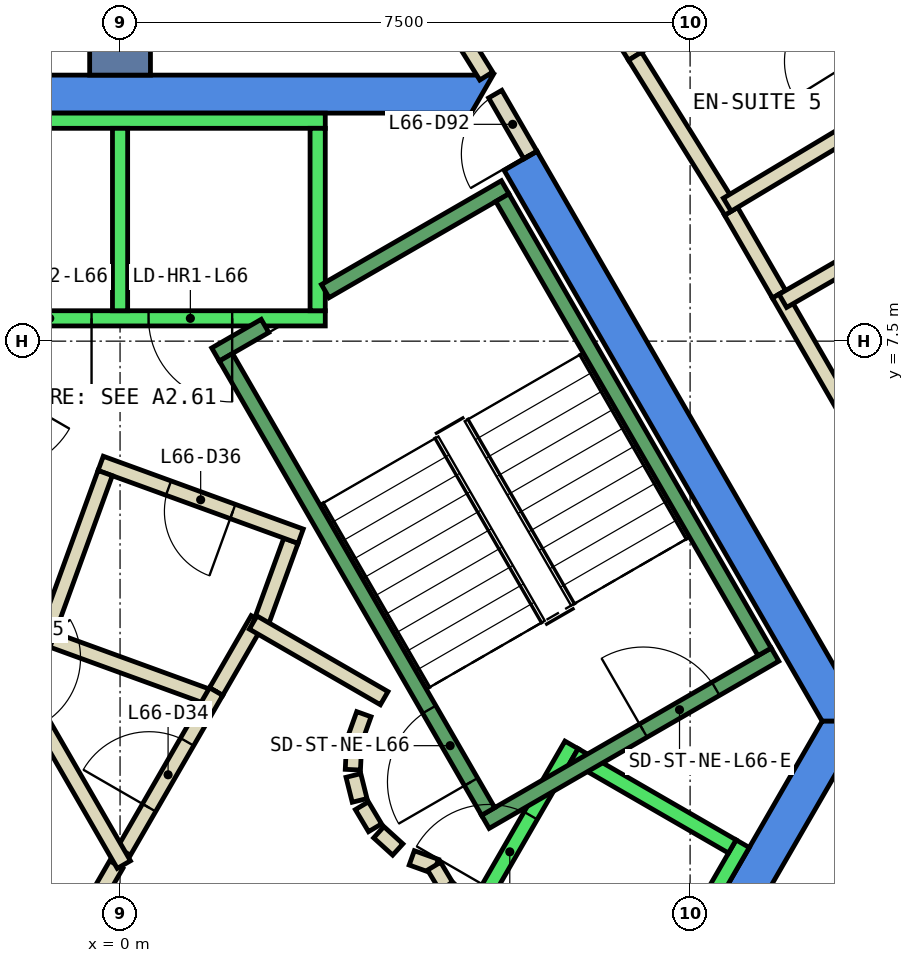
"""IFC4 building model, lengths in metres.
Left out: names, types, materials, properties, quantities, classifications, styles, units other than length and angle.
Written with IfcOpenShell. Run it as: python <this file> out.ifc"""

import sys

from ifc_helpers import new_model, si_unit, direction, frame, frame_2d, origin, place, context, subcontext, project, spatial, polyline, rectangle, outline, extrude, element, fill, save


model = new_model("IFC4")
c1 = context("Model", 3, precision=1e-05, world=origin(), true_north=direction((0.0, 1.0)))
c2 = subcontext(c1, "Body", "Model", "MODEL_VIEW")
j1 = project(units=[si_unit("LENGTHUNIT", "METRE"), si_unit("PLANEANGLEUNIT", "RADIAN")], contexts=[c1])
p1 = place(None, origin())
s1 = spatial("IfcSite", under=j1, at=p1, CompositionType="ELEMENT")
p2 = place(p1, origin())
s2 = spatial("IfcBuilding", under=s1, at=p2, CompositionType="ELEMENT")
p3 = place(p2, frame((0.0, 0.0, 286.4)))
s3 = spatial("IfcBuildingStorey", under=s2, at=p3, CompositionType="ELEMENT", Elevation=286.4)
p4 = place(p3, frame((0.0, 0.0, -0.6)))
e1 = element("IfcWall", 1, at=p4, inside=s3, PredefinedType="SHEAR", context=c2, shape_type="SweptSolid", body=[
    extrude(outline(polyline([(5.486, 9.998), (5.053, 9.748), (9.238, 2.5), (9.815, 2.5), (5.486, 9.998)])), origin(), (0.0, 0.0, 1.0), 3.86),
])
p5 = place(p3, frame((0.0, 0.0, -0.6)))
e2 = element("IfcWall", 2, at=p5, inside=s3, PredefinedType="SHEAR", context=c2, shape_type="SweptSolid", body=[
    extrude(outline(polyline([(4.907, 11.0), (-4.907, 11.0), (-4.619, 10.5), (4.619, 10.5), (4.907, 11.0)])), origin(), (0.0, 0.0, 1.0), 3.86),
])
p6 = place(p3, frame((0.0, 0.0, -0.6)))
e3 = element("IfcWall", 3, at=p6, inside=s3, PredefinedType="SHEAR", context=c2, shape_type="SweptSolid", body=[
    extrude(outline(polyline([(4.907, -6.0), (9.815, 2.5), (9.238, 2.5), (4.619, -5.5), (4.907, -6.0)])), origin(), (0.0, 0.0, 1.0), 3.86),
])
p7 = place(p3, frame((0.0, 11.0, -0.6), z_axis=(0.0, 0.0, 1.0), x_axis=(0.0, 1.0, 0.0)))
e4 = element("IfcWall", 4, at=p7, inside=s3, PredefinedType="SHEAR", context=c2, shape_type="SweptSolid", body=[
    extrude(rectangle(XDim=9.0, YDim=0.8, at=frame_2d((4.5, 0.0))), origin(), (0.0, 0.0, 1.0), 3.86),
])
p8 = place(p3, frame((1.264, 2.89, 0.0), z_axis=(0.0, 0.0, 1.0), x_axis=(0.500043792738, 0.866000118559, 0.0)))
e5 = element("IfcWall", 5, at=p8, inside=s3, PredefinedType="PARTITIONING", context=c2, shape_type="SweptSolid", body=[
    extrude(rectangle(XDim=1.096, YDim=0.2, at=frame_2d((0.548, 0.0))), origin(), (0.0, 0.0, 1.0), 3.26),
])
p9 = place(p3, frame((1.838, 3.748, 0.0), z_axis=(0.0, 0.0, 1.0), x_axis=(0.342266462435, 0.939602931398, 0.0)))
e6 = element("IfcWall", 6, at=p9, inside=s3, PredefinedType="PARTITIONING", context=c2, shape_type="SweptSolid", body=[
    extrude(rectangle(XDim=1.198, YDim=0.2, at=frame_2d((0.599, 0.0))), origin(), (0.0, 0.0, 1.0), 3.26),
])
p10 = place(p3, frame((2.376, 4.934, 0.0), z_axis=(0.0, 0.0, 1.0), x_axis=(-0.939640574808, 0.342163104635, 0.0)))
e7 = element("IfcWall", 7, at=p10, inside=s3, PredefinedType="PARTITIONING", context=c2, shape_type="SweptSolid", body=[
    extrude(rectangle(XDim=2.8, YDim=0.2, at=frame_2d((1.4, 0.0))), origin(), (0.0, 0.0, 1.0), 3.26),
])
p11 = place(p10, frame((0.95, 0.0, 0.0)))
e8 = element("IfcOpeningElement", 8, at=p11, cuts=e7, PredefinedType="OPENING", context=c2, shape_type="SweptSolid", body=[
    extrude(rectangle(XDim=0.9, YDim=2.1, at=frame_2d((0.45, 1.05))), frame((0.0, 0.11, 0.0), z_axis=(0.0, -1.0, 0.0), x_axis=(1.0, 0.0, 0.0)), (0.0, 0.0, 1.0), 0.22),
])
p12 = place(p3, frame((-0.196, 5.764, 0.0), z_axis=(0.0, 0.0, 1.0), x_axis=(-0.34165322761, -0.939826086073, 0.0)))
e9 = element("IfcWall", 9, at=p12, inside=s3, PredefinedType="PARTITIONING", context=c2, shape_type="SweptSolid", body=[
    extrude(rectangle(XDim=2.4, YDim=0.2, at=frame_2d((1.2, 0.0))), origin(), (0.0, 0.0, 1.0), 3.26),
])
p13 = place(p3, frame((-0.888, 3.568, 0.0), z_axis=(0.0, 0.0, 1.0), x_axis=(0.939685034098, -0.34204098686, 0.0)))
e10 = element("IfcWall", 10, at=p13, inside=s3, PredefinedType="PARTITIONING", context=c2, shape_type="SweptSolid", body=[
    extrude(rectangle(XDim=2.237, YDim=0.2, at=frame_2d((1.119, 0.0))), origin(), (0.0, 0.0, 1.0), 3.26),
])
p14 = place(p3, frame((2.62, 14.526, 0.0), z_axis=(0.0, 0.0, 1.0), x_axis=(0.527726136463, -0.84941457775, 0.0)))
e11 = element("IfcWall", 11, at=p14, inside=s3, PredefinedType="PARTITIONING", context=c2, shape_type="SweptSolid", body=[
    extrude(rectangle(XDim=4.165, YDim=0.2, at=frame_2d((2.083, 0.0))), origin(), (0.0, 0.0, 1.0), 2.4),
])
p15 = place(p14, frame((1.583, 0.0, 0.0)))
e12 = element("IfcOpeningElement", 12, at=p15, cuts=e11, PredefinedType="OPENING", context=c2, shape_type="SweptSolid", body=[
    extrude(rectangle(XDim=1.0, YDim=2.1, at=frame_2d((0.5, 1.05))), frame((0.0, 0.11, 0.0), z_axis=(0.0, -1.0, 0.0), x_axis=(1.0, 0.0, 0.0)), (0.0, 0.0, 1.0), 0.22),
])
p16 = place(p3, frame((8.039, 9.209, 0.0), z_axis=(0.0, 0.0, 1.0), x_axis=(0.500219543227, -0.865898613334, 0.0)))
e13 = element("IfcWall", 13, at=p16, inside=s3, PredefinedType="PARTITIONING", context=c2, shape_type="SweptSolid", body=[
    extrude(rectangle(XDim=1.261, YDim=0.2, at=frame_2d((0.631, 0.0))), origin(), (0.0, 0.0, 1.0), 3.26),
])
p17 = place(p3, frame((8.67, 8.117, 0.0), z_axis=(0.0, 0.0, 1.0), x_axis=(0.50002537861, -0.866010750942, 0.0)))
e14 = element("IfcWall", 14, at=p17, inside=s3, PredefinedType="PARTITIONING", context=c2, shape_type="SweptSolid", body=[
    extrude(rectangle(XDim=3.0, YDim=0.2, at=frame_2d((1.5, 0.0))), origin(), (0.0, 0.0, 1.0), 3.26),
])
p18 = place(p3, frame((4.022, 15.68, 0.0), z_axis=(0.0, 0.0, 1.0), x_axis=(0.527737948498, -0.849407239029, 0.0)))
e15 = element("IfcWall", 15, at=p18, inside=s3, PredefinedType="PARTITIONING", context=c2, shape_type="SweptSolid", body=[
    extrude(rectangle(XDim=5.217, YDim=0.2, at=frame_2d((2.608, 0.0))), origin(), (0.0, 0.0, 1.0), 3.26),
])
p19 = place(p18, frame((2.159, 0.0, 0.0)))
e16 = element("IfcOpeningElement", 16, at=p19, cuts=e15, PredefinedType="OPENING", context=c2, shape_type="SweptSolid", body=[
    extrude(rectangle(XDim=1.0, YDim=2.1, at=frame_2d((0.5, 1.05))), frame((0.0, 0.11, 0.0), z_axis=(0.0, -1.0, 0.0), x_axis=(1.0, 0.0, 0.0)), (0.0, 0.0, 1.0), 0.22),
])
p20 = place(p3, frame((6.775, 11.249, 0.0), z_axis=(0.0, 0.0, 1.0), x_axis=(0.527803270752, -0.849366650736, 0.0)))
e17 = element("IfcWall", 17, at=p20, inside=s3, PredefinedType="PARTITIONING", context=c2, shape_type="SweptSolid", body=[
    extrude(rectangle(XDim=2.401, YDim=0.2, at=frame_2d((1.2, 0.0))), origin(), (0.0, 0.0, 1.0), 3.26),
])
p21 = place(p3, frame((-0.982, -1.0, 0.0), z_axis=(0.0, 0.0, 1.0), x_axis=(0.50024047865, 0.865886518847, 0.0)))
e18 = element("IfcWall", 18, at=p21, inside=s3, PredefinedType="PARTITIONING", context=c2, shape_type="SweptSolid", body=[
    extrude(rectangle(XDim=1.863, YDim=0.2, at=frame_2d((0.931, 0.0))), origin(), (0.0, 0.0, 1.0), 3.26),
])
p22 = place(p3, frame((0.05, 0.787, 0.0), z_axis=(0.0, 0.0, 1.0), x_axis=(0.499945861543, 0.866056658381, 0.0)))
e19 = element("IfcWall", 19, at=p22, inside=s3, PredefinedType="PARTITIONING", context=c2, shape_type="SweptSolid", body=[
    extrude(rectangle(XDim=2.428, YDim=0.2, at=frame_2d((1.214, 0.0))), origin(), (0.0, 0.0, 1.0), 3.26),
])
p23 = place(p22, frame((0.664, 0.0, 0.0)))
e20 = element("IfcOpeningElement", 20, at=p23, cuts=e19, PredefinedType="OPENING", context=c2, shape_type="SweptSolid", body=[
    extrude(rectangle(XDim=1.0, YDim=2.1, at=frame_2d((0.5, 1.05))), frame((0.0, 0.11, 0.0), z_axis=(0.0, -1.0, 0.0), x_axis=(1.0, 0.0, 0.0)), (0.0, 0.0, 1.0), 0.22),
])
p24 = place(p3, frame((1.751, 3.798, 0.0), z_axis=(0.0, 0.0, 1.0), x_axis=(0.866091650241, -0.499885240213, 0.0)))
e21 = element("IfcWall", 21, at=p24, inside=s3, PredefinedType="PARTITIONING", context=c2, shape_type="SweptSolid", body=[
    extrude(rectangle(XDim=1.991, YDim=0.2, at=frame_2d((0.995, 0.0))), origin(), (0.0, 0.0, 1.0), 3.26),
])
p25 = place(p3, frame((3.208, 2.592, 0.0), z_axis=(0.0, 0.0, 1.0), x_axis=(-0.337388820924, -0.941365382578, 0.0)))
e22 = element("IfcWall", 22, at=p25, inside=s3, PredefinedType="PARTITIONING", context=c2, shape_type="SweptSolid", body=[
    extrude(rectangle(XDim=0.338, YDim=0.2, at=frame_2d((0.169, 0.0))), origin(), (0.0, 0.0, 1.0), 3.26),
])
p26 = place(p3, frame((3.079, 2.199, 0.0), z_axis=(0.0, 0.0, 1.0), x_axis=(-0.047771483479, -0.998858290933, 0.0)))
e23 = element("IfcWall", 23, at=p26, inside=s3, PredefinedType="PARTITIONING", context=c2, shape_type="SweptSolid", body=[
    extrude(rectangle(XDim=0.337, YDim=0.2, at=frame_2d((0.169, 0.0))), origin(), (0.0, 0.0, 1.0), 3.26),
])
p27 = place(p3, frame((3.07, 1.786, 0.0), z_axis=(0.0, 0.0, 1.0), x_axis=(0.242705583207, -0.970099994784, 0.0)))
e24 = element("IfcWall", 24, at=p27, inside=s3, PredefinedType="PARTITIONING", context=c2, shape_type="SweptSolid", body=[
    extrude(rectangle(XDim=0.338, YDim=0.2, at=frame_2d((0.169, 0.0))), origin(), (0.0, 0.0, 1.0), 3.26),
])
for number, where, z_axis, x_axis in (
    (25, (3.182, 1.388, 0.0), (0.0, 0.0, 1.0), (0.512, -0.859, 0.0)),
    (26, (3.404, 1.039, 0.0), (0.0, 0.0, 1.0), (0.74, -0.672, 0.0)),
):
    element("IfcWall", number, at=place(p3, frame(where, z_axis=z_axis, x_axis=x_axis)), inside=s3, PredefinedType="PARTITIONING", context=c2, shape_type="SweptSolid", body=[
        extrude(rectangle(XDim=0.338, YDim=0.2, at=frame_2d((0.169, 0.0))), origin(), (0.0, 0.0, 1.0), 3.26),
    ])
p28 = place(p3, frame((3.838, 0.702, 0.0), z_axis=(0.0, 0.0, 1.0), x_axis=(0.941035081519, -0.338308993895, 0.0)))
e27 = element("IfcWall", 27, at=p28, inside=s3, PredefinedType="PARTITIONING", context=c2, shape_type="SweptSolid", body=[
    extrude(rectangle(XDim=0.337, YDim=0.2, at=frame_2d((0.168, 0.0))), origin(), (0.0, 0.0, 1.0), 3.26),
])
p29 = place(p3, frame((4.132, 0.593, 0.0), z_axis=(0.0, 0.0, 1.0), x_axis=(0.513561617048, -0.858052717201, 0.0)))
e28 = element("IfcWall", 28, at=p29, inside=s3, PredefinedType="PARTITIONING", context=c2, shape_type="SweptSolid", body=[
    extrude(rectangle(XDim=0.308, YDim=0.2, at=frame_2d((0.154, 0.0))), origin(), (0.0, 0.0, 1.0), 3.26),
])
p30 = place(p3, frame((4.301, 0.315, 0.0), z_axis=(0.0, 0.0, 1.0), x_axis=(0.741798017506, -0.670623367639, 0.0)))
e29 = element("IfcWall", 29, at=p30, inside=s3, PredefinedType="PARTITIONING", context=c2, shape_type="SweptSolid", body=[
    extrude(rectangle(XDim=0.309, YDim=0.2, at=frame_2d((0.154, 0.0))), origin(), (0.0, 0.0, 1.0), 3.26),
])
p31 = place(p3, frame((-2.54, 5.1, 0.0), z_axis=(0.0, 0.0, 1.0), x_axis=(0.499925051871, -0.866068670783, 0.0)))
e30 = element("IfcWall", 30, at=p31, inside=s3, PredefinedType="PARTITIONING", context=c2, shape_type="SweptSolid", body=[
    extrude(rectangle(XDim=5.181, YDim=0.2, at=frame_2d((2.59, 0.0))), origin(), (0.0, 0.0, 1.0), 3.26),
])
p32 = place(p31, frame((2.04, 0.0, 0.0)))
e31 = element("IfcOpeningElement", 31, at=p32, cuts=e30, PredefinedType="OPENING", context=c2, shape_type="SweptSolid", body=[
    extrude(rectangle(XDim=1.0, YDim=2.1, at=frame_2d((0.5, 1.05))), frame((0.0, 0.11, 0.0), z_axis=(0.0, -1.0, 0.0), x_axis=(1.0, 0.0, 0.0)), (0.0, 0.0, 1.0), 0.22),
])
p33 = place(p3, frame((10.885, 9.28, 0.0), z_axis=(0.0, 0.0, 1.0), x_axis=(-0.866022959057, -0.500004234368, 0.0)))
e32 = element("IfcWall", 32, at=p33, inside=s3, PredefinedType="PARTITIONING", context=c2, shape_type="SweptSolid", body=[
    extrude(rectangle(XDim=2.5, YDim=0.2, at=frame_2d((1.25, 0.0))), origin(), (0.0, 0.0, 1.0), 3.26),
])
p34 = place(p3, frame((7.989, 9.295, 0.0), z_axis=(0.0, 0.0, 1.0), x_axis=(0.857801856135, 0.513980520654, 0.0)))
e33 = element("IfcWall", 33, at=p34, inside=s3, PredefinedType="PARTITIONING", context=c2, shape_type="SweptSolid", body=[
    extrude(rectangle(XDim=2.3, YDim=0.2, at=frame_2d((1.15, 0.0))), origin(), (0.0, 0.0, 1.0), 3.26),
])
p35 = place(p3, frame((10.1, 10.443, 0.0), z_axis=(0.0, 0.0, 1.0), x_axis=(-0.527510239672, 0.849548672555, 0.0)))
e34 = element("IfcWall", 34, at=p35, inside=s3, PredefinedType="PARTITIONING", context=c2, shape_type="SweptSolid", body=[
    extrude(rectangle(XDim=2.639, YDim=0.2, at=frame_2d((1.319, 0.0))), origin(), (0.0, 0.0, 1.0), 3.26),
])
p36 = place(p35, frame((0.869, 0.0, 0.0)))
e35 = element("IfcOpeningElement", 35, at=p36, cuts=e34, PredefinedType="OPENING", context=c2, shape_type="SweptSolid", body=[
    extrude(rectangle(XDim=0.9, YDim=2.1, at=frame_2d((0.45, 1.05))), frame((0.0, 0.11, 0.0), z_axis=(0.0, -1.0, 0.0), x_axis=(1.0, 0.0, 0.0)), (0.0, 0.0, 1.0), 0.22),
])
p37 = place(p3, frame((5.399, 9.948, 0.0), z_axis=(0.0, 0.0, 1.0), x_axis=(-0.499882215713, 0.866093395895, 0.0)))
e36 = element("IfcWall", 36, at=p37, inside=s3, PredefinedType="PARTITIONING", context=c2, shape_type="SweptSolid", body=[
    extrude(rectangle(XDim=0.926, YDim=0.2, at=frame_2d((0.463, 0.0))), origin(), (0.0, 0.0, 1.0), 2.4),
])
p38 = place(p37, frame((0.017, 0.0, 0.0)))
e37 = element("IfcOpeningElement", 37, at=p38, cuts=e36, PredefinedType="OPENING", context=c2, shape_type="SweptSolid", body=[
    extrude(rectangle(XDim=0.9, YDim=2.1, at=frame_2d((0.45, 1.05))), frame((0.0, 0.11, 0.0), z_axis=(0.0, -1.0, 0.0), x_axis=(1.0, 0.0, 0.0)), (0.0, 0.0, 1.0), 0.22),
])
p39 = place(p3, frame((2.7, 7.8, 0.0), z_axis=(0.0, 0.0, 1.0), x_axis=(-1.0, 0.0, 0.0)))
e38 = element("IfcWall", 38, at=p39, inside=s3, PredefinedType="STANDARD", context=c2, shape_type="SweptSolid", body=[
    extrude(rectangle(XDim=5.4, YDim=0.2, at=frame_2d((2.7, 0.0))), origin(), (0.0, 0.0, 1.0), 3.26),
])
p40 = place(p39, frame((1.225, 0.0, 0.0)))
e39 = element("IfcOpeningElement", 39, at=p40, cuts=e38, PredefinedType="OPENING", context=c2, shape_type="SweptSolid", body=[
    extrude(rectangle(XDim=1.1, YDim=2.1, at=frame_2d((0.55, 1.05))), frame((0.0, 0.11, 0.0), z_axis=(0.0, -1.0, 0.0), x_axis=(1.0, 0.0, 0.0)), (0.0, 0.0, 1.0), 0.22),
])
p41 = place(p39, frame((3.075, 0.0, 0.0)))
e40 = element("IfcOpeningElement", 40, at=p41, cuts=e38, PredefinedType="OPENING", context=c2, shape_type="SweptSolid", body=[
    extrude(rectangle(XDim=1.1, YDim=2.1, at=frame_2d((0.55, 1.05))), frame((0.0, 0.11, 0.0), z_axis=(0.0, -1.0, 0.0), x_axis=(1.0, 0.0, 0.0)), (0.0, 0.0, 1.0), 0.22),
])
p42 = place(p3, frame((2.7, 10.4, 0.0), z_axis=(0.0, 0.0, 1.0), x_axis=(-1.0, 0.0, 0.0)))
e41 = element("IfcWall", 41, at=p42, inside=s3, PredefinedType="STANDARD", context=c2, shape_type="SweptSolid", body=[
    extrude(rectangle(XDim=5.4, YDim=0.2, at=frame_2d((2.7, 0.0))), origin(), (0.0, 0.0, 1.0), 3.26),
])
for number, where, z_axis, x_axis in (
    (42, (2.6, 7.9, 0.0), (0.0, 0.0, 1.0), (0.0, 1.0, 0.0)),
    (43, (0.0, 7.9, 0.0), (0.0, 0.0, 1.0), (0.0, 1.0, 0.0)),
):
    element("IfcWall", number, at=place(p3, frame(where, z_axis=z_axis, x_axis=x_axis)), inside=s3, PredefinedType="STANDARD", context=c2, shape_type="SweptSolid", body=[
        extrude(rectangle(XDim=2.4, YDim=0.2, at=frame_2d((1.2, 0.0))), origin(), (0.0, 0.0, 1.0), 3.26),
    ])
p43 = place(p3, frame((3.24, -2.488, 0.0), z_axis=(0.0, 0.0, 1.0), x_axis=(0.500034260056, 0.866005622828, 0.0)))
e44 = element("IfcWall", 44, at=p43, inside=s3, PredefinedType="STANDARD", context=c2, shape_type="SweptSolid", body=[
    extrude(rectangle(XDim=5.399, YDim=0.2, at=frame_2d((2.7, 0.0))), origin(), (0.0, 0.0, 1.0), 3.26),
])
p44 = place(p43, frame((3.225, 0.0, 0.0)))
e45 = element("IfcOpeningElement", 45, at=p44, cuts=e44, PredefinedType="OPENING", context=c2, shape_type="SweptSolid", body=[
    extrude(rectangle(XDim=1.1, YDim=2.1, at=frame_2d((0.55, 1.05))), frame((0.0, 0.11, 0.0), z_axis=(0.0, -1.0, 0.0), x_axis=(1.0, 0.0, 0.0)), (0.0, 0.0, 1.0), 0.22),
])
p45 = place(p43, frame((1.225, 0.0, 0.0)))
e46 = element("IfcOpeningElement", 46, at=p45, cuts=e44, PredefinedType="OPENING", context=c2, shape_type="SweptSolid", body=[
    extrude(rectangle(XDim=1.1, YDim=2.1, at=frame_2d((0.55, 1.05))), frame((0.0, 0.11, 0.0), z_axis=(0.0, -1.0, 0.0), x_axis=(1.0, 0.0, 0.0)), (0.0, 0.0, 1.0), 0.22),
])
p46 = place(p3, frame((5.492, -3.788, 0.0), z_axis=(0.0, 0.0, 1.0), x_axis=(0.500034260056, 0.866005622828, 0.0)))
e47 = element("IfcWall", 47, at=p46, inside=s3, PredefinedType="STANDARD", context=c2, shape_type="SweptSolid", body=[
    extrude(rectangle(XDim=5.399, YDim=0.2, at=frame_2d((2.7, 0.0))), origin(), (0.0, 0.0, 1.0), 3.26),
])
p47 = place(p3, frame((5.977, 2.052, 0.0), z_axis=(0.0, 0.0, 1.0), x_axis=(0.865973769406, -0.500089422704, 0.0)))
e48 = element("IfcWall", 48, at=p47, inside=s3, PredefinedType="STANDARD", context=c2, shape_type="SweptSolid", body=[
    extrude(rectangle(XDim=2.399, YDim=0.2, at=frame_2d((1.2, 0.0))), origin(), (0.0, 0.0, 1.0), 3.26),
])
p48 = place(p3, frame((4.806, 1.176, 0.0), z_axis=(0.0, 0.0, 1.0), x_axis=(0.866059941101, 0.499940174841, 0.0)))
e49 = element("IfcWall", 49, at=p48, inside=s3, PredefinedType="STANDARD", context=c2, shape_type="SweptSolid", body=[
    extrude(rectangle(XDim=4.4, YDim=0.2, at=frame_2d((2.2, 0.0))), origin(), (0.0, 0.0, 1.0), 3.26),
])
p49 = place(p48, frame((2.4, 0.0, 0.0)))
e50 = element("IfcOpeningElement", 50, at=p49, cuts=e49, PredefinedType="OPENING", context=c2, shape_type="SweptSolid", body=[
    extrude(rectangle(XDim=1.1, YDim=2.2, at=frame_2d((0.55, 1.1))), frame((0.0, 0.11, 0.0), z_axis=(0.0, -1.0, 0.0), x_axis=(1.0, 0.0, 0.0)), (0.0, 0.0, 1.0), 0.22),
])
p50 = place(p3, frame((2.7, 8.158, 0.0), z_axis=(0.0, 0.0, 1.0), x_axis=(0.86611865017, 0.499838457731, 0.0)))
e51 = element("IfcWall", 51, at=p50, inside=s3, PredefinedType="STANDARD", context=c2, shape_type="SweptSolid", body=[
    extrude(rectangle(XDim=2.733, YDim=0.2, at=frame_2d((1.366, 0.0))), origin(), (0.0, 0.0, 1.0), 3.26),
])
p51 = place(p3, frame((1.256, 7.324, 0.0), z_axis=(0.0, 0.0, 1.0), x_axis=(0.865915093549, 0.500191014278, 0.0)))
e52 = element("IfcWall", 52, at=p51, inside=s3, PredefinedType="STANDARD", context=c2, shape_type="SweptSolid", body=[
    extrude(rectangle(XDim=0.752, YDim=0.2, at=frame_2d((0.376, 0.0))), origin(), (0.0, 0.0, 1.0), 3.26),
])
p52 = place(p3, frame((4.843, 1.312, 0.0), z_axis=(0.0, 0.0, 1.0), x_axis=(-0.499963383562, 0.866046543262, 0.0)))
e53 = element("IfcWall", 53, at=p52, inside=s3, PredefinedType="STANDARD", context=c2, shape_type="SweptSolid", body=[
    extrude(rectangle(XDim=6.9, YDim=0.2, at=frame_2d((3.45, 0.0))), origin(), (0.0, 0.0, 1.0), 3.26),
])
p53 = place(p52, frame((0.45, 0.0, 0.0)))
e54 = element("IfcOpeningElement", 54, at=p53, cuts=e53, PredefinedType="OPENING", context=c2, shape_type="SweptSolid", body=[
    extrude(rectangle(XDim=1.1, YDim=2.2, at=frame_2d((0.55, 1.1))), frame((0.0, 0.11, 0.0), z_axis=(0.0, -1.0, 0.0), x_axis=(1.0, 0.0, 0.0)), (0.0, 0.0, 1.0), 0.22),
])
p54 = place(p3, frame((8.48, 3.412, 0.0), z_axis=(0.0, 0.0, 1.0), x_axis=(-0.499978703459, 0.866037698999, 0.0)))
e55 = element("IfcWall", 55, at=p54, inside=s3, PredefinedType="STANDARD", context=c2, shape_type="SweptSolid", body=[
    extrude(rectangle(XDim=6.9, YDim=0.2, at=frame_2d((3.45, 0.0))), origin(), (0.0, 0.0, 1.0), 3.26),
])
p55 = place(p36, origin())
e56 = element("IfcDoor", 56, at=p55, inside=s3, OperationType="SINGLE_SWING_LEFT", PredefinedType="DOOR", context=c2, shape_type="SweptSolid", body=[
    extrude(rectangle(XDim=0.9, YDim=2.1, at=frame_2d((0.45, 1.05))), frame((0.0, 0.025, 0.0), z_axis=(0.0, -1.0, 0.0), x_axis=(1.0, 0.0, 0.0)), (0.0, 0.0, 1.0), 0.05),
])
fill(e35, e56)
p56 = place(p23, origin())
e57 = element("IfcDoor", 57, at=p56, inside=s3, OperationType="SINGLE_SWING_RIGHT", PredefinedType="DOOR", context=c2, shape_type="SweptSolid", body=[
    extrude(rectangle(XDim=1.0, YDim=2.1, at=frame_2d((0.5, 1.05))), frame((0.0, 0.025, 0.0), z_axis=(0.0, -1.0, 0.0), x_axis=(1.0, 0.0, 0.0)), (0.0, 0.0, 1.0), 0.05),
])
fill(e20, e57)
p57 = place(p11, origin())
e58 = element("IfcDoor", 58, at=p57, inside=s3, OperationType="SINGLE_SWING_LEFT", PredefinedType="DOOR", context=c2, shape_type="SweptSolid", body=[
    extrude(rectangle(XDim=0.9, YDim=2.1, at=frame_2d((0.45, 1.05))), frame((0.0, 0.025, 0.0), z_axis=(0.0, -1.0, 0.0), x_axis=(1.0, 0.0, 0.0)), (0.0, 0.0, 1.0), 0.05),
])
fill(e8, e58)
p58 = place(p38, origin())
e59 = element("IfcDoor", 59, at=p58, inside=s3, OperationType="SINGLE_SWING_LEFT", PredefinedType="DOOR", context=c2, shape_type="SweptSolid", body=[
    extrude(rectangle(XDim=0.9, YDim=2.1, at=frame_2d((0.45, 1.05))), frame((0.0, 0.025, 0.0), z_axis=(0.0, -1.0, 0.0), x_axis=(1.0, 0.0, 0.0)), (0.0, 0.0, 1.0), 0.05),
])
fill(e37, e59)
p59 = place(p40, origin())
e60 = element("IfcDoor", 60, at=p59, inside=s3, OperationType="SLIDING_TO_LEFT", PredefinedType="DOOR", context=c2, shape_type="SweptSolid", body=[
    extrude(rectangle(XDim=1.1, YDim=2.1, at=frame_2d((0.55, 1.05))), frame((0.0, 0.025, 0.0), z_axis=(0.0, -1.0, 0.0), x_axis=(1.0, 0.0, 0.0)), (0.0, 0.0, 1.0), 0.05),
])
fill(e39, e60)
p60 = place(p41, origin())
e61 = element("IfcDoor", 61, at=p60, inside=s3, OperationType="SLIDING_TO_LEFT", PredefinedType="DOOR", context=c2, shape_type="SweptSolid", body=[
    extrude(rectangle(XDim=1.1, YDim=2.1, at=frame_2d((0.55, 1.05))), frame((0.0, 0.025, 0.0), z_axis=(0.0, -1.0, 0.0), x_axis=(1.0, 0.0, 0.0)), (0.0, 0.0, 1.0), 0.05),
])
fill(e40, e61)
p61 = place(p44, origin())
e62 = element("IfcDoor", 62, at=p61, inside=s3, OperationType="SLIDING_TO_LEFT", PredefinedType="DOOR", context=c2, shape_type="SweptSolid", body=[
    extrude(rectangle(XDim=1.1, YDim=2.1, at=frame_2d((0.55, 1.05))), frame((0.0, 0.025, 0.0), z_axis=(0.0, -1.0, 0.0), x_axis=(1.0, 0.0, 0.0)), (0.0, 0.0, 1.0), 0.05),
])
fill(e45, e62)
p62 = place(p53, origin())
e63 = element("IfcDoor", 63, at=p62, inside=s3, OperationType="SINGLE_SWING_LEFT", PredefinedType="DOOR", context=c2, shape_type="SweptSolid", body=[
    extrude(rectangle(XDim=1.1, YDim=2.2, at=frame_2d((0.55, 1.1))), frame((0.0, 0.025, 0.0), z_axis=(0.0, -1.0, 0.0), x_axis=(1.0, 0.0, 0.0)), (0.0, 0.0, 1.0), 0.05),
])
fill(e54, e63)
p63 = place(p49, origin())
e64 = element("IfcDoor", 64, at=p63, inside=s3, OperationType="SINGLE_SWING_LEFT", PredefinedType="DOOR", context=c2, shape_type="SweptSolid", body=[
    extrude(rectangle(XDim=1.1, YDim=2.2, at=frame_2d((0.55, 1.1))), frame((0.0, 0.025, 0.0), z_axis=(0.0, -1.0, 0.0), x_axis=(1.0, 0.0, 0.0)), (0.0, 0.0, 1.0), 0.05),
])
fill(e50, e64)
save(model, sys.argv[1])
